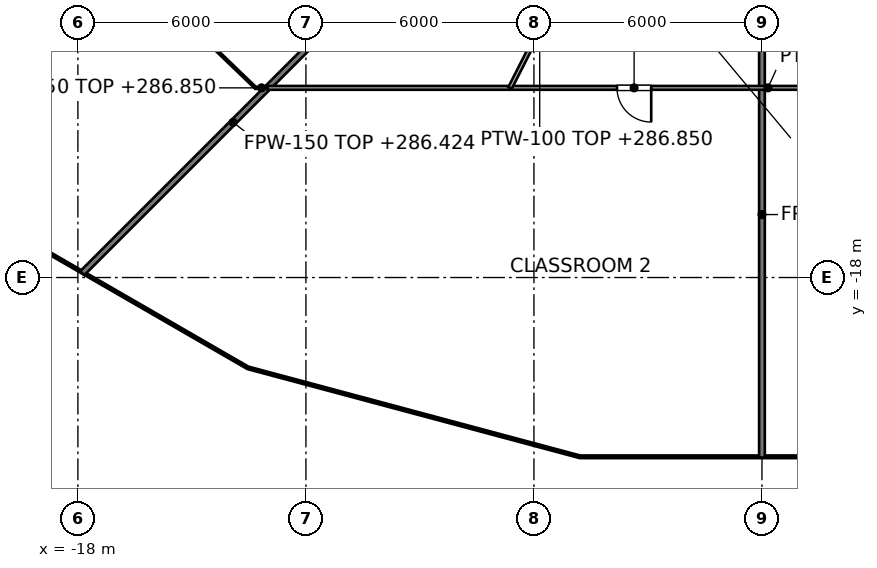
"""IFC4 building model, lengths in metres.
Left out: names, types, materials, properties, quantities, classifications, styles, units other than length and angle.
Written with IfcOpenShell. Run it as: python <this file> out.ifc"""

import sys

from ifc_helpers import new_model, si_unit, direction, frame, frame_2d, origin, place, context, subcontext, project, spatial, rectangle, extrude, element, fill, save


model = new_model("IFC4")
c1 = context("Model", 3, precision=1e-05, world=origin(), true_north=direction((0.0, 1.0)))
c2 = subcontext(c1, "Body", "Model", "MODEL_VIEW")
j1 = project(units=[si_unit("LENGTHUNIT", "METRE"), si_unit("PLANEANGLEUNIT", "RADIAN")], contexts=[c1])
p1 = place(None, origin())
s1 = spatial("IfcSite", under=j1, at=p1, CompositionType="ELEMENT")
p2 = place(p1, origin())
s2 = spatial("IfcBuilding", under=s1, at=p2, CompositionType="ELEMENT")
p3 = place(p2, frame((0.0, 0.0, 283.0)))
s3 = spatial("IfcBuildingStorey", under=s2, at=p3, CompositionType="ELEMENT", Elevation=283.0)
p4 = place(p3, frame((-17.884, -17.884, 0.0), z_axis=(0.0, 0.0, 1.0), x_axis=(0.707106781187, 0.707106781187, 0.0)))
e1 = element("IfcWall", 1, at=p4, inside=s3, PredefinedType="PARTITIONING", context=c2, shape_type="SweptSolid", body=[
    extrude(rectangle(XDim=11.222, YDim=0.15, at=frame_2d((5.611, 0.0))), origin(), (0.0, 0.0, 1.0), 3.424),
])
p5 = place(p3, frame((0.0, -22.738, 0.0), z_axis=(0.0, 0.0, 1.0), x_axis=(0.0, 1.0, 0.0)))
e2 = element("IfcWall", 2, at=p5, inside=s3, PredefinedType="PARTITIONING", context=c2, shape_type="SweptSolid", body=[
    extrude(rectangle(XDim=12.789, YDim=0.15, at=frame_2d((6.395, 0.0))), origin(), (0.0, 0.0, 1.0), 2.995),
])
p6 = place(p3, frame((-21.06, -5.582, 0.0), z_axis=(0.0, 0.0, 1.0), x_axis=(0.72130541771, -0.692617134051, 0.0)))
e3 = element("IfcWall", 3, at=p6, inside=s3, PredefinedType="PARTITIONING", context=c2, shape_type="SweptSolid", body=[
    extrude(rectangle(XDim=10.723, YDim=0.05, at=frame_2d((5.361, 0.0))), origin(), (0.0, 0.0, 1.0), 2.927),
])
p7 = place(p6, frame((6.395, 0.0, 0.0)))
e4 = element("IfcOpeningElement", 4, at=p7, cuts=e3, PredefinedType="OPENING", context=c2, shape_type="SweptSolid", body=[
    extrude(rectangle(XDim=1.0, YDim=2.1, at=frame_2d((0.5, 1.05))), frame((0.0, 0.025, 0.0), z_axis=(0.0, -1.0, 0.0), x_axis=(1.0, 0.0, 0.0)), (0.0, 0.0, 1.0), 0.05),
])
p8 = place(p3, frame((-13.326, -13.009, 0.0), z_axis=(0.0, 0.0, 1.0), x_axis=(1.0, 0.0, 0.0)))
e5 = element("IfcWall", 5, at=p8, inside=s3, PredefinedType="PARTITIONING", context=c2, shape_type="SweptSolid", body=[
    extrude(rectangle(XDim=0.317, YDim=0.05, at=frame_2d((0.158, 0.0))), origin(), (0.0, 0.0, 1.0), 3.85),
])
p9 = place(p3, frame((-13.009, -13.009, 0.0), z_axis=(0.0, 0.0, 1.0), x_axis=(1.0, 0.0, 0.0)))
e6 = element("IfcWall", 6, at=p9, inside=s3, PredefinedType="PARTITIONING", context=c2, shape_type="SweptSolid", body=[
    extrude(rectangle(XDim=26.335, YDim=0.1, at=frame_2d((13.167, 0.0))), origin(), (0.0, 0.0, 1.0), 2.927),
])
p10 = place(p9, frame((18.822, 0.0, 0.0)))
e7 = element("IfcOpeningElement", 7, at=p10, cuts=e6, PredefinedType="OPENING", context=c2, shape_type="SweptSolid", body=[
    extrude(rectangle(XDim=1.8, YDim=2.1, at=frame_2d((0.9, 1.05))), frame((0.0, 0.05, 0.0), z_axis=(0.0, -1.0, 0.0), x_axis=(1.0, 0.0, 0.0)), (0.0, 0.0, 1.0), 0.1),
])
p11 = place(p9, frame((9.195, 0.0, 0.0)))
e8 = element("IfcOpeningElement", 8, at=p11, cuts=e6, PredefinedType="OPENING", context=c2, shape_type="SweptSolid", body=[
    extrude(rectangle(XDim=0.9, YDim=2.1, at=frame_2d((0.45, 1.05))), frame((0.0, 0.05, 0.0), z_axis=(0.0, -1.0, 0.0), x_axis=(1.0, 0.0, 0.0)), (0.0, 0.0, 1.0), 0.1),
])
p12 = place(p3, frame((-6.628, -13.009, 0.0), z_axis=(0.0, 0.0, 1.0), x_axis=(0.453911937029, 0.891046549526, 0.0)))
e9 = element("IfcWall", 9, at=p12, inside=s3, PredefinedType="PARTITIONING", context=c2, shape_type="SweptSolid", body=[
    extrude(rectangle(XDim=3.434, YDim=0.1, at=frame_2d((1.717, 0.0))), origin(), (0.0, 0.0, 1.0), 3.85),
])
p13 = place(p11, origin())
e10 = element("IfcDoor", 10, at=p13, inside=s3, OperationType="SINGLE_SWING_RIGHT", PredefinedType="DOOR", context=c2, shape_type="SweptSolid", body=[
    extrude(rectangle(XDim=0.9, YDim=2.1, at=frame_2d((0.45, 1.05))), frame((0.0, 0.025, 0.0), z_axis=(0.0, -1.0, 0.0), x_axis=(1.0, 0.0, 0.0)), (0.0, 0.0, 1.0), 0.05),
])
fill(e8, e10)
save(model, sys.argv[1])
